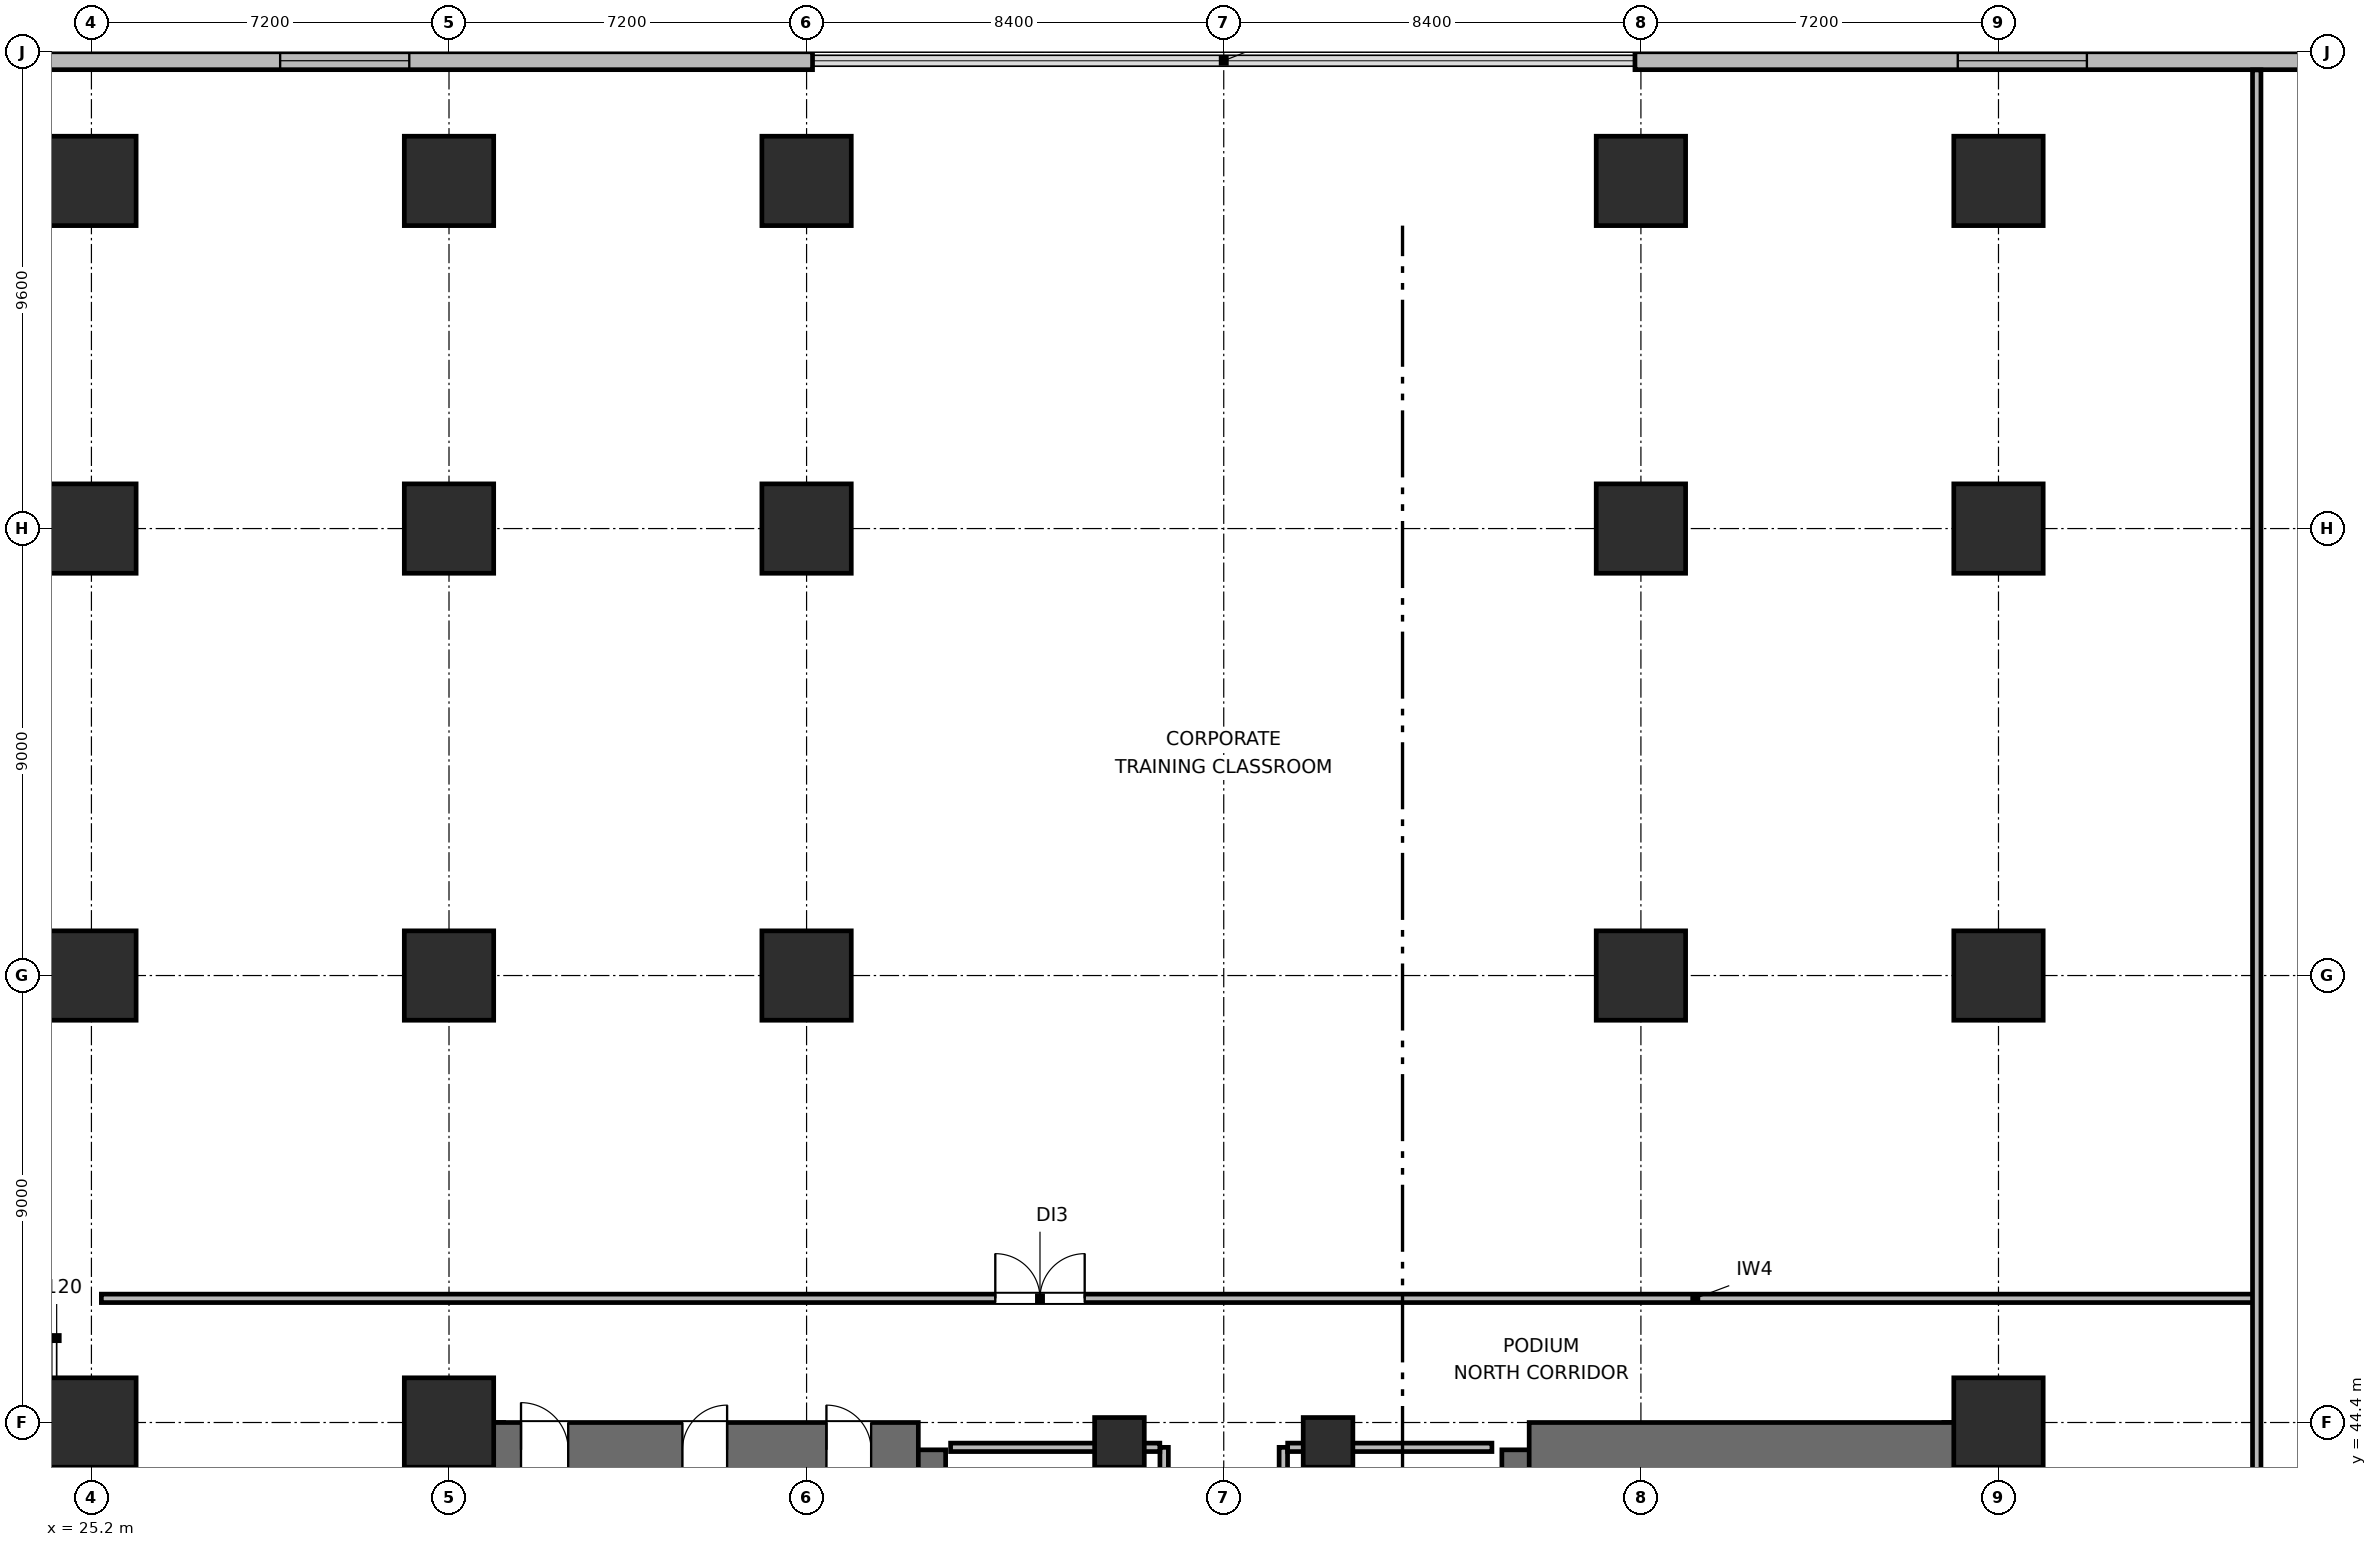
"""IFC4 building model, lengths in metres.
Left out: names, types, materials, properties, quantities, classifications, styles, units other than length and angle.
Written with IfcOpenShell. Run it as: python <this file> out.ifc"""

import sys

from ifc_helpers import new_model, si_unit, direction, frame, frame_2d, origin, origin_2d, place, context, subcontext, project, spatial, rectangle, extrude, element, fill, save


model = new_model("IFC4")
c1 = context("Model", 3, precision=1e-05, world=origin(), true_north=direction((0.0, 1.0)))
c2 = subcontext(c1, "Body", "Model", "MODEL_VIEW")
j1 = project(units=[si_unit("LENGTHUNIT", "METRE"), si_unit("PLANEANGLEUNIT", "RADIAN")], contexts=[c1])
p1 = place(None, origin())
s1 = spatial("IfcSite", under=j1, at=p1, CompositionType="ELEMENT")
p2 = place(p1, origin())
s2 = spatial("IfcBuilding", under=s1, at=p2, CompositionType="ELEMENT")
p3 = place(p2, frame((0.0, 0.0, 8.7)))
s3 = spatial("IfcBuildingStorey", under=s2, at=p3, CompositionType="ELEMENT", Elevation=8.7)
p4 = place(p3, frame((32.95, 27.6, 0.0), z_axis=(0.0, 0.0, 1.0), x_axis=(0.0, 1.0, 0.0)))
e1 = element("IfcWall", 1, at=p4, inside=s3, PredefinedType="SHEAR", context=c2, shape_type="SweptSolid", body=[
    extrude(rectangle(XDim=16.8, YDim=1.1, at=frame_2d((8.4, 0.0))), origin(), (0.0, 0.0, 1.0), 4.2),
])
p5 = place(p3, frame((41.85, 37.8, 0.0), z_axis=(0.0, 0.0, 1.0), x_axis=(0.0, 1.0, 0.0)))
e2 = element("IfcWall", 2, at=p5, inside=s3, PredefinedType="SHEAR", context=c2, shape_type="SweptSolid", body=[
    extrude(rectangle(XDim=6.05, YDim=1.1, at=frame_2d((3.025, 0.0))), origin(), (0.0, 0.0, 1.0), 4.2),
])
p6 = place(p3, frame((32.95, 43.85, 0.0), z_axis=(0.0, 0.0, 1.0), x_axis=(1.0, 0.0, 0.0)))
e3 = element("IfcWall", 3, at=p6, inside=s3, PredefinedType="SHEAR", context=c2, shape_type="SweptSolid", body=[
    extrude(rectangle(XDim=8.9, YDim=1.1, at=frame_2d((4.45, 0.0))), origin(), (0.0, 0.0, 1.0), 4.2),
])
p7 = place(p6, frame((0.9, 0.0, 0.0)))
e4 = element("IfcOpeningElement", 4, at=p7, cuts=e3, PredefinedType="OPENING", context=c2, shape_type="SweptSolid", body=[
    extrude(rectangle(XDim=0.95, YDim=2.04, at=frame_2d((0.475, 1.02))), frame((0.0, 0.56, 0.0), z_axis=(0.0, -1.0, 0.0), x_axis=(1.0, 0.0, 0.0)), (0.0, 0.0, 1.0), 1.12),
])
p8 = place(p6, frame((4.15, 0.0, 0.0)))
e5 = element("IfcOpeningElement", 5, at=p8, cuts=e3, PredefinedType="OPENING", context=c2, shape_type="SweptSolid", body=[
    extrude(rectangle(XDim=0.9, YDim=2.02, at=frame_2d((0.45, 1.01))), frame((0.0, 0.56, 0.0), z_axis=(0.0, -1.0, 0.0), x_axis=(1.0, 0.0, 0.0)), (0.0, 0.0, 1.0), 1.12),
])
p9 = place(p6, frame((7.05, 0.0, 0.0)))
e6 = element("IfcOpeningElement", 6, at=p9, cuts=e3, PredefinedType="OPENING", context=c2, shape_type="SweptSolid", body=[
    extrude(rectangle(XDim=0.9, YDim=2.02, at=frame_2d((0.45, 1.01))), frame((0.0, 0.56, 0.0), z_axis=(0.0, -1.0, 0.0), x_axis=(1.0, 0.0, 0.0)), (0.0, 0.0, 1.0), 1.12),
])
p10 = place(p3, frame((54.15, 38.0, 0.0), z_axis=(0.0, 0.0, 1.0), x_axis=(0.0, 1.0, 0.0)))
e7 = element("IfcWall", 7, at=p10, inside=s3, PredefinedType="SHEAR", context=c2, shape_type="SweptSolid", body=[
    extrude(rectangle(XDim=5.85, YDim=1.1, at=frame_2d((2.925, 0.0))), origin(), (0.0, 0.0, 1.0), 4.2),
])
p11 = place(p3, frame((63.05, 27.6, 0.0), z_axis=(0.0, 0.0, 1.0), x_axis=(0.0, 1.0, 0.0)))
e8 = element("IfcWall", 8, at=p11, inside=s3, PredefinedType="SHEAR", context=c2, shape_type="SweptSolid", body=[
    extrude(rectangle(XDim=16.8, YDim=1.1, at=frame_2d((8.4, 0.0))), origin(), (0.0, 0.0, 1.0), 4.2),
])
p12 = place(p3, frame((54.15, 43.85, 0.0), z_axis=(0.0, 0.0, 1.0), x_axis=(1.0, 0.0, 0.0)))
e9 = element("IfcWall", 9, at=p12, inside=s3, PredefinedType="SHEAR", context=c2, shape_type="SweptSolid", body=[
    extrude(rectangle(XDim=8.9, YDim=1.1, at=frame_2d((4.45, 0.0))), origin(), (0.0, 0.0, 1.0), 4.2),
])
for number, where, z_axis, x_axis in (
    (10, (25.2, 44.4, 0.0), (0.0, 0.0, 1.0), (1.0, 0.0, 0.0)),
    (11, (25.2, 53.4, 0.0), (0.0, 0.0, 1.0), (1.0, 0.0, 0.0)),
    (12, (25.2, 62.4, 0.0), (0.0, 0.0, 1.0), (1.0, 0.0, 0.0)),
    (13, (25.2, 69.4, 0.0), (0.0, 0.0, 1.0), (1.0, 0.0, 0.0)),
    (14, (32.4, 44.4, 0.0), (0.0, 0.0, 1.0), (1.0, 0.0, 0.0)),
    (15, (32.4, 53.4, 0.0), (0.0, 0.0, 1.0), (1.0, 0.0, 0.0)),
    (16, (32.4, 62.4, 0.0), (0.0, 0.0, 1.0), (1.0, 0.0, 0.0)),
    (17, (32.4, 69.4, 0.0), (0.0, 0.0, 1.0), (1.0, 0.0, 0.0)),
    (18, (39.6, 53.4, 0.0), (0.0, 0.0, 1.0), (1.0, 0.0, 0.0)),
    (19, (39.6, 62.4, 0.0), (0.0, 0.0, 1.0), (1.0, 0.0, 0.0)),
    (20, (39.6, 69.4, 0.0), (0.0, 0.0, 1.0), (1.0, 0.0, 0.0)),
    (21, (56.4, 53.4, 0.0), (0.0, 0.0, 1.0), (1.0, 0.0, 0.0)),
    (22, (56.4, 62.4, 0.0), (0.0, 0.0, 1.0), (1.0, 0.0, 0.0)),
    (23, (56.4, 69.4, 0.0), (0.0, 0.0, 1.0), (1.0, 0.0, 0.0)),
    (24, (63.6, 44.4, 0.0), (0.0, 0.0, 1.0), (1.0, 0.0, 0.0)),
    (25, (63.6, 53.4, 0.0), (0.0, 0.0, 1.0), (1.0, 0.0, 0.0)),
    (26, (63.6, 62.4, 0.0), (0.0, 0.0, 1.0), (1.0, 0.0, 0.0)),
    (27, (63.6, 69.4, 0.0), (0.0, 0.0, 1.0), (1.0, 0.0, 0.0)),
):
    element("IfcColumn", number, at=place(p3, frame(where, z_axis=z_axis, x_axis=x_axis)), inside=s3, PredefinedType="COLUMN", context=c2, shape_type="SweptSolid", body=[
        extrude(rectangle(XDim=1.8, YDim=1.8, at=origin_2d()), origin(), (0.0, 0.0, 1.0), 4.2),
    ])
for number, where, z_axis, x_axis in (
    (28, (45.9, 44.0, 0.0), (0.0, 0.0, 1.0), (1.0, 0.0, 0.0)),
    (29, (50.1, 44.0, 0.0), (0.0, 0.0, 1.0), (1.0, 0.0, 0.0)),
):
    element("IfcColumn", number, at=place(p3, frame(where, z_axis=z_axis, x_axis=x_axis)), inside=s3, PredefinedType="COLUMN", context=c2, shape_type="SweptSolid", body=[
        extrude(rectangle(XDim=1.0, YDim=1.0, at=origin_2d()), origin(), (0.0, 0.0, 1.0), 4.2),
    ])
p13 = place(p3, frame((0.0, 71.82, 0.0), z_axis=(0.0, 0.0, 1.0), x_axis=(1.0, 0.0, 0.0)))
e30 = element("IfcWall", 30, at=p13, inside=s3, PredefinedType="SOLIDWALL", context=c2, shape_type="SweptSolid", body=[
    extrude(rectangle(XDim=39.72, YDim=0.36, at=frame_2d((19.86, 0.0))), origin(), (0.0, 0.0, 1.0), 3.88),
])
p14 = place(p13, frame((13.0, 0.0, 0.7)))
e31 = element("IfcOpeningElement", 31, at=p14, cuts=e30, PredefinedType="OPENING", context=c2, shape_type="SweptSolid", body=[
    extrude(rectangle(XDim=2.6, YDim=1.6, at=frame_2d((1.3, 0.8))), frame((0.0, 0.19, 0.0), z_axis=(0.0, -1.0, 0.0), x_axis=(1.0, 0.0, 0.0)), (0.0, 0.0, 1.0), 0.38),
])
p15 = place(p13, frame((29.0, 0.0, 0.7)))
e32 = element("IfcOpeningElement", 32, at=p15, cuts=e30, PredefinedType="OPENING", context=c2, shape_type="SweptSolid", body=[
    extrude(rectangle(XDim=2.6, YDim=1.6, at=frame_2d((1.3, 0.8))), frame((0.0, 0.19, 0.0), z_axis=(0.0, -1.0, 0.0), x_axis=(1.0, 0.0, 0.0)), (0.0, 0.0, 1.0), 0.38),
])
p16 = place(p3, frame((56.28, 71.82, 0.0), z_axis=(0.0, 0.0, 1.0), x_axis=(1.0, 0.0, 0.0)))
e33 = element("IfcWall", 33, at=p16, inside=s3, PredefinedType="SOLIDWALL", context=c2, shape_type="SweptSolid", body=[
    extrude(rectangle(XDim=39.72, YDim=0.36, at=frame_2d((19.86, 0.0))), origin(), (0.0, 0.0, 1.0), 3.88),
])
p17 = place(p16, frame((6.5, 0.0, 0.7)))
e34 = element("IfcOpeningElement", 34, at=p17, cuts=e33, PredefinedType="OPENING", context=c2, shape_type="SweptSolid", body=[
    extrude(rectangle(XDim=2.6, YDim=1.6, at=frame_2d((1.3, 0.8))), frame((0.0, 0.19, 0.0), z_axis=(0.0, -1.0, 0.0), x_axis=(1.0, 0.0, 0.0)), (0.0, 0.0, 1.0), 0.38),
])
p18 = place(p16, frame((29.0, 0.0, 0.7)))
e35 = element("IfcOpeningElement", 35, at=p18, cuts=e33, PredefinedType="OPENING", context=c2, shape_type="SweptSolid", body=[
    extrude(rectangle(XDim=2.6, YDim=1.6, at=frame_2d((1.3, 0.8))), frame((0.0, 0.19, 0.0), z_axis=(0.0, -1.0, 0.0), x_axis=(1.0, 0.0, 0.0)), (0.0, 0.0, 1.0), 0.38),
])
p19 = place(p3, frame((46.8, 37.9, 0.0), z_axis=(0.0, 0.0, 1.0), x_axis=(0.0, 1.0, 0.0)))
e36 = element("IfcWall", 36, at=p19, inside=s3, PredefinedType="PARTITIONING", context=c2, shape_type="SweptSolid", body=[
    extrude(rectangle(XDim=6.0, YDim=0.17, at=frame_2d((3.0, 0.0))), origin(), (0.0, 0.0, 1.0), 3.88),
])
p20 = place(p19, frame((1.47, 0.0, 0.0)))
e37 = element("IfcOpeningElement", 37, at=p20, cuts=e36, PredefinedType="OPENING", context=c2, shape_type="SweptSolid", body=[
    extrude(rectangle(XDim=0.9, YDim=2.02, at=frame_2d((0.45, 1.01))), frame((0.0, 0.095, 0.0), z_axis=(0.0, -1.0, 0.0), x_axis=(1.0, 0.0, 0.0)), (0.0, 0.0, 1.0), 0.19),
])
p21 = place(p19, frame((4.47, 0.0, 0.0)))
e38 = element("IfcOpeningElement", 38, at=p21, cuts=e36, PredefinedType="OPENING", context=c2, shape_type="SweptSolid", body=[
    extrude(rectangle(XDim=0.9, YDim=2.02, at=frame_2d((0.45, 1.01))), frame((0.0, 0.095, 0.0), z_axis=(0.0, -1.0, 0.0), x_axis=(1.0, 0.0, 0.0)), (0.0, 0.0, 1.0), 0.19),
])
p22 = place(p3, frame((42.5, 43.9, 0.0), z_axis=(0.0, 0.0, 1.0), x_axis=(1.0, 0.0, 0.0)))
e39 = element("IfcWall", 39, at=p22, inside=s3, PredefinedType="PARTITIONING", context=c2, shape_type="SweptSolid", body=[
    extrude(rectangle(XDim=4.213, YDim=0.17, at=frame_2d((2.106, 0.0))), origin(), (0.0, 0.0, 1.0), 2.765),
])
p23 = place(p3, frame((49.2, 37.9, 0.0), z_axis=(0.0, 0.0, 1.0), x_axis=(0.0, 1.0, 0.0)))
e40 = element("IfcWall", 40, at=p23, inside=s3, PredefinedType="PARTITIONING", context=c2, shape_type="SweptSolid", body=[
    extrude(rectangle(XDim=6.0, YDim=0.17, at=frame_2d((3.0, 0.0))), origin(), (0.0, 0.0, 1.0), 3.88),
])
p24 = place(p23, frame((2.55, 0.0, 0.0)))
e41 = element("IfcOpeningElement", 41, at=p24, cuts=e40, PredefinedType="OPENING", context=c2, shape_type="SweptSolid", body=[
    extrude(rectangle(XDim=0.9, YDim=2.02, at=frame_2d((0.45, 1.01))), frame((0.0, 0.095, 0.0), z_axis=(0.0, -1.0, 0.0), x_axis=(1.0, 0.0, 0.0)), (0.0, 0.0, 1.0), 0.19),
])
p25 = place(p3, frame((49.287, 43.9, 0.0), z_axis=(0.0, 0.0, 1.0), x_axis=(1.0, 0.0, 0.0)))
e42 = element("IfcWall", 42, at=p25, inside=s3, PredefinedType="PARTITIONING", context=c2, shape_type="SweptSolid", body=[
    extrude(rectangle(XDim=4.113, YDim=0.17, at=frame_2d((2.056, 0.0))), origin(), (0.0, 0.0, 1.0), 2.765),
])
p26 = place(p3, frame((25.4, 46.9, 0.0), z_axis=(0.0, 0.0, 1.0), x_axis=(1.0, 0.0, 0.0)))
e43 = element("IfcWall", 43, at=p26, inside=s3, PredefinedType="PARTITIONING", context=c2, shape_type="SweptSolid", body=[
    extrude(rectangle(XDim=43.4, YDim=0.17, at=frame_2d((21.7, 0.0))), origin(), (0.0, 0.0, 1.0), 3.88),
])
p27 = place(p26, frame((18.0, 0.0, 0.0)))
e44 = element("IfcOpeningElement", 44, at=p27, cuts=e43, PredefinedType="OPENING", context=c2, shape_type="SweptSolid", body=[
    extrude(rectangle(XDim=1.8, YDim=2.06, at=frame_2d((0.9, 1.03))), frame((0.0, 0.095, 0.0), z_axis=(0.0, -1.0, 0.0), x_axis=(1.0, 0.0, 0.0)), (0.0, 0.0, 1.0), 0.19),
])
p28 = place(p3, frame((68.8, 25.187, 0.0), z_axis=(0.0, 0.0, 1.0), x_axis=(0.0, 1.0, 0.0)))
e45 = element("IfcWall", 45, at=p28, inside=s3, PredefinedType="PARTITIONING", context=c2, shape_type="SweptSolid", body=[
    extrude(rectangle(XDim=46.448, YDim=0.17, at=frame_2d((23.224, 0.0))), origin(), (0.0, 0.0, 1.0), 3.88),
])
p29 = place(p28, frame((15.913, 0.0, 0.0)))
e46 = element("IfcOpeningElement", 46, at=p29, cuts=e45, PredefinedType="OPENING", context=c2, shape_type="SweptSolid", body=[
    extrude(rectangle(XDim=1.1, YDim=2.05, at=frame_2d((0.55, 1.025))), frame((0.0, 0.095, 0.0), z_axis=(0.0, -1.0, 0.0), x_axis=(1.0, 0.0, 0.0)), (0.0, 0.0, 1.0), 0.19),
])
p30 = place(p15, origin())
e47 = element("IfcWindow", 47, at=p30, inside=s3, PartitioningType="SINGLE_PANEL", PredefinedType="WINDOW", context=c2, shape_type="SweptSolid", body=[
    extrude(rectangle(XDim=2.6, YDim=1.6, at=frame_2d((1.3, 0.8))), frame((0.0, 0.03, 0.0), z_axis=(0.0, -1.0, 0.0), x_axis=(1.0, 0.0, 0.0)), (0.0, 0.0, 1.0), 0.06),
])
fill(e32, e47)
p31 = place(p17, origin())
e48 = element("IfcWindow", 48, at=p31, inside=s3, PartitioningType="SINGLE_PANEL", PredefinedType="WINDOW", context=c2, shape_type="SweptSolid", body=[
    extrude(rectangle(XDim=2.6, YDim=1.6, at=frame_2d((1.3, 0.8))), frame((0.0, 0.03, 0.0), z_axis=(0.0, -1.0, 0.0), x_axis=(1.0, 0.0, 0.0)), (0.0, 0.0, 1.0), 0.06),
])
fill(e34, e48)
p32 = place(p7, origin())
e49 = element("IfcDoor", 49, at=p32, inside=s3, OperationType="SINGLE_SWING_LEFT", PredefinedType="DOOR", context=c2, shape_type="SweptSolid", body=[
    extrude(rectangle(XDim=0.95, YDim=2.04, at=frame_2d((0.475, 1.02))), frame((0.0, 0.025, 0.0), z_axis=(0.0, -1.0, 0.0), x_axis=(1.0, 0.0, 0.0)), (0.0, 0.0, 1.0), 0.05),
])
fill(e4, e49)
p33 = place(p8, origin())
e50 = element("IfcDoor", 50, at=p33, inside=s3, OperationType="SINGLE_SWING_RIGHT", PredefinedType="DOOR", context=c2, shape_type="SweptSolid", body=[
    extrude(rectangle(XDim=0.9, YDim=2.02, at=frame_2d((0.45, 1.01))), frame((0.0, 0.025, 0.0), z_axis=(0.0, -1.0, 0.0), x_axis=(1.0, 0.0, 0.0)), (0.0, 0.0, 1.0), 0.05),
])
fill(e5, e50)
p34 = place(p9, origin())
e51 = element("IfcDoor", 51, at=p34, inside=s3, OperationType="SINGLE_SWING_LEFT", PredefinedType="DOOR", context=c2, shape_type="SweptSolid", body=[
    extrude(rectangle(XDim=0.9, YDim=2.02, at=frame_2d((0.45, 1.01))), frame((0.0, 0.025, 0.0), z_axis=(0.0, -1.0, 0.0), x_axis=(1.0, 0.0, 0.0)), (0.0, 0.0, 1.0), 0.05),
])
fill(e6, e51)
p35 = place(p27, origin())
e52 = element("IfcDoor", 52, at=p35, inside=s3, OperationType="DOUBLE_DOOR_SINGLE_SWING", PredefinedType="DOOR", context=c2, shape_type="SweptSolid", body=[
    extrude(rectangle(XDim=1.8, YDim=2.06, at=frame_2d((0.9, 1.03))), frame((0.0, 0.025, 0.0), z_axis=(0.0, -1.0, 0.0), x_axis=(1.0, 0.0, 0.0)), (0.0, 0.0, 1.0), 0.05),
])
fill(e44, e52)
save(model, sys.argv[1])
